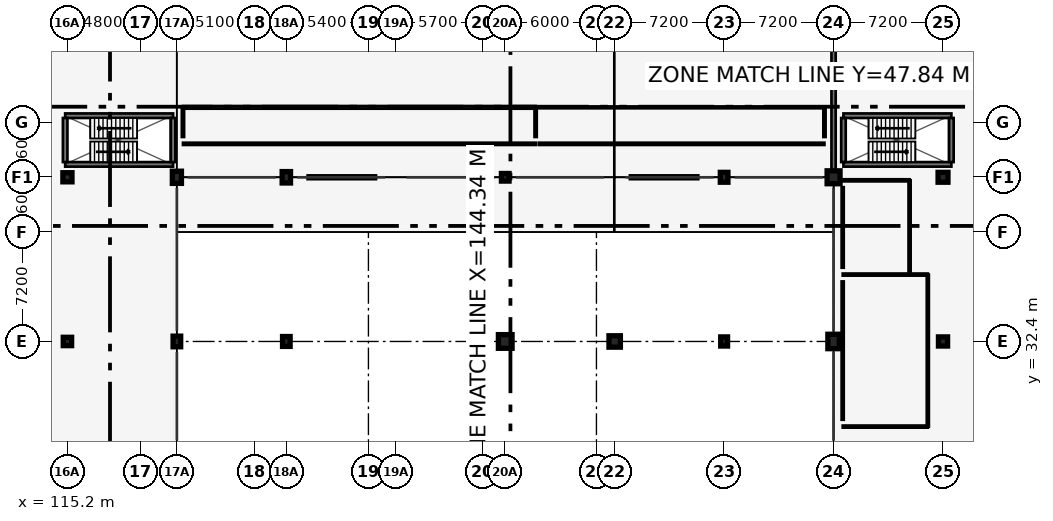
"""IFC4 building model, lengths in metres.
Left out: names, types, materials, properties, quantities, classifications, styles, units other than length and angle.
Written with IfcOpenShell. Run it as: python <this file> out.ifc"""

import sys

from ifc_helpers import new_model, si_unit, direction, frame, frame_2d, origin, origin_2d, place, context, subcontext, project, spatial, rectangle, circle, extrude, element, fill, save


model = new_model("IFC4")
c1 = context("Model", 3, precision=1e-05, world=origin(), true_north=direction((0.0, 1.0)))
c2 = subcontext(c1, "Body", "Model", "MODEL_VIEW")
j1 = project(units=[si_unit("LENGTHUNIT", "METRE"), si_unit("PLANEANGLEUNIT", "RADIAN")], contexts=[c1])
p1 = place(None, origin())
s1 = spatial("IfcSite", under=j1, at=p1, CompositionType="ELEMENT")
p2 = place(p1, origin())
s2 = spatial("IfcBuilding", under=s1, at=p2, CompositionType="ELEMENT")
p3 = place(p2, frame((0.0, 0.0, 4.8)))
s3 = spatial("IfcBuildingStorey", under=s2, at=p3, CompositionType="ELEMENT", Elevation=4.8)
p4 = place(p3, frame((115.2, 32.4, 0.0), z_axis=(0.0, 0.0, 1.0), x_axis=(1.0, 0.0, 0.0)))
e1 = element("IfcColumn", 1, at=p4, inside=s3, PredefinedType="COLUMN", context=c2, shape_type="SweptSolid", body=[
    extrude(rectangle(XDim=0.55, YDim=0.55, at=origin_2d()), origin(), (0.0, 0.0, 1.0), 4.2),
])
p5 = place(p3, frame((115.2, 43.2, 0.0), z_axis=(0.0, 0.0, 1.0), x_axis=(1.0, 0.0, 0.0)))
e2 = element("IfcColumn", 2, at=p5, inside=s3, PredefinedType="COLUMN", context=c2, shape_type="SweptSolid", body=[
    extrude(rectangle(XDim=0.6, YDim=0.6, at=origin_2d()), origin(), (0.0, 0.0, 1.0), 4.2),
])
p6 = place(p3, frame((122.4, 32.4, 0.0), z_axis=(0.0, 0.0, 1.0), x_axis=(1.0, 0.0, 0.0)))
e3 = element("IfcColumn", 3, at=p6, inside=s3, PredefinedType="COLUMN", context=c2, shape_type="SweptSolid", body=[
    extrude(rectangle(XDim=0.5, YDim=0.7, at=origin_2d()), origin(), (0.0, 0.0, 1.0), 4.2),
])
p7 = place(p3, frame((122.4, 43.2, 0.0), z_axis=(0.0, 0.0, 1.0), x_axis=(1.0, 0.0, 0.0)))
e4 = element("IfcColumn", 4, at=p7, inside=s3, PredefinedType="COLUMN", context=c2, shape_type="SweptSolid", body=[
    extrude(rectangle(XDim=0.6, YDim=0.8, at=origin_2d()), origin(), (0.0, 0.0, 1.0), 4.2),
])
p8 = place(p3, frame((129.6, 32.4, 0.0), z_axis=(0.0, 0.0, 1.0), x_axis=(1.0, 0.0, 0.0)))
e5 = element("IfcColumn", 5, at=p8, inside=s3, PredefinedType="COLUMN", context=c2, shape_type="SweptSolid", body=[
    extrude(rectangle(XDim=0.5, YDim=0.65, at=origin_2d()), origin(), (0.0, 0.0, 1.0), 4.2),
])
p9 = place(p3, frame((129.6, 43.2, 0.0), z_axis=(0.0, 0.0, 1.0), x_axis=(1.0, 0.0, 0.0)))
e6 = element("IfcColumn", 6, at=p9, inside=s3, PredefinedType="COLUMN", context=c2, shape_type="SweptSolid", body=[
    extrude(rectangle(XDim=0.55, YDim=0.75, at=origin_2d()), origin(), (0.0, 0.0, 1.0), 4.2),
])
p10 = place(p3, frame((144.0, 32.4, 0.0), z_axis=(0.0, 0.0, 1.0), x_axis=(1.0, 0.0, 0.0)))
e7 = element("IfcColumn", 7, at=p10, inside=s3, PredefinedType="COLUMN", context=c2, shape_type="SweptSolid", body=[
    extrude(circle(Radius=0.45, at=origin_2d()), origin(), (0.0, 0.0, 1.0), 4.2),
])
p11 = place(p3, frame((144.0, 43.2, 0.0), z_axis=(0.0, 0.0, 1.0), x_axis=(1.0, 0.0, 0.0)))
e8 = element("IfcColumn", 8, at=p11, inside=s3, PredefinedType="COLUMN", context=c2, shape_type="SweptSolid", body=[
    extrude(rectangle(XDim=0.5, YDim=0.5, at=origin_2d()), origin(), (0.0, 0.0, 1.0), 4.2),
])
p12 = place(p3, frame((151.2, 32.4, 0.0), z_axis=(0.0, 0.0, 1.0), x_axis=(1.0, 0.0, 0.0)))
e9 = element("IfcColumn", 9, at=p12, inside=s3, PredefinedType="COLUMN", context=c2, shape_type="SweptSolid", body=[
    extrude(rectangle(XDim=0.75, YDim=0.75, at=origin_2d()), origin(), (0.0, 0.0, 1.0), 4.2),
])
p13 = place(p3, frame((158.4, 32.4, 0.0), z_axis=(0.0, 0.0, 1.0), x_axis=(1.0, 0.0, 0.0)))
e10 = element("IfcColumn", 10, at=p13, inside=s3, PredefinedType="COLUMN", context=c2, shape_type="SweptSolid", body=[
    extrude(rectangle(XDim=0.45, YDim=0.6, at=origin_2d()), origin(), (0.0, 0.0, 1.0), 4.2),
])
p14 = place(p3, frame((158.4, 43.2, 0.0), z_axis=(0.0, 0.0, 1.0), x_axis=(1.0, 0.0, 0.0)))
e11 = element("IfcColumn", 11, at=p14, inside=s3, PredefinedType="COLUMN", context=c2, shape_type="SweptSolid", body=[
    extrude(rectangle(XDim=0.5, YDim=0.65, at=origin_2d()), origin(), (0.0, 0.0, 1.0), 4.2),
])
p15 = place(p3, frame((165.6, 32.4, 0.0), z_axis=(0.0, 0.0, 1.0), x_axis=(1.0, 0.0, 0.0)))
e12 = element("IfcColumn", 12, at=p15, inside=s3, PredefinedType="COLUMN", context=c2, shape_type="SweptSolid", body=[
    extrude(rectangle(XDim=0.75, YDim=0.95, at=origin_2d()), origin(), (0.0, 0.0, 1.0), 4.2),
])
p16 = place(p3, frame((165.6, 43.2, 0.0), z_axis=(0.0, 0.0, 1.0), x_axis=(1.0, 0.0, 0.0)))
e13 = element("IfcColumn", 13, at=p16, inside=s3, PredefinedType="COLUMN", context=c2, shape_type="SweptSolid", body=[
    extrude(rectangle(XDim=0.85, YDim=0.85, at=origin_2d()), origin(), (0.0, 0.0, 1.0), 4.2),
])
p17 = place(p3, frame((172.8, 32.4, 0.0), z_axis=(0.0, 0.0, 1.0), x_axis=(1.0, 0.0, 0.0)))
e14 = element("IfcColumn", 14, at=p17, inside=s3, PredefinedType="COLUMN", context=c2, shape_type="SweptSolid", body=[
    extrude(rectangle(XDim=0.6, YDim=0.6, at=origin_2d()), origin(), (0.0, 0.0, 1.0), 4.2),
])
p18 = place(p3, frame((172.8, 43.2, 0.0), z_axis=(0.0, 0.0, 1.0), x_axis=(1.0, 0.0, 0.0)))
e15 = element("IfcColumn", 15, at=p18, inside=s3, PredefinedType="COLUMN", context=c2, shape_type="SweptSolid", body=[
    extrude(rectangle(XDim=0.65, YDim=0.65, at=origin_2d()), origin(), (0.0, 0.0, 1.0), 4.2),
])
p19 = place(p3, frame((165.6, 86.4, 0.0), z_axis=(0.0, 0.0, 1.0), x_axis=(0.0, -1.0, 0.0)))
e16 = element("IfcWall", 16, at=p19, inside=s3, PredefinedType="SOLIDWALL", context=c2, shape_type="SweptSolid", body=[
    extrude(rectangle(XDim=43.2, YDim=0.28, at=frame_2d((21.6, 0.0))), origin(), (0.0, 0.0, 1.0), 3.5),
])
p20 = place(p19, frame((9.4, 0.0, 0.78)))
e17 = element("IfcOpeningElement", 17, at=p20, cuts=e16, PredefinedType="OPENING", context=c2, shape_type="SweptSolid", body=[
    extrude(rectangle(XDim=1.25, YDim=1.7, at=frame_2d((0.625, 0.85))), frame((0.0, 0.15, 0.0), z_axis=(0.0, -1.0, 0.0), x_axis=(1.0, 0.0, 0.0)), (0.0, 0.0, 1.0), 0.3),
])
p21 = place(p19, frame((16.6, 0.0, 0.78)))
e18 = element("IfcOpeningElement", 18, at=p21, cuts=e16, PredefinedType="OPENING", context=c2, shape_type="SweptSolid", body=[
    extrude(rectangle(XDim=1.35, YDim=1.75, at=frame_2d((0.675, 0.875))), frame((0.0, 0.15, 0.0), z_axis=(0.0, -1.0, 0.0), x_axis=(1.0, 0.0, 0.0)), (0.0, 0.0, 1.0), 0.3),
])
p22 = place(p19, frame((23.8, 0.0, 0.78)))
e19 = element("IfcOpeningElement", 19, at=p22, cuts=e16, PredefinedType="OPENING", context=c2, shape_type="SweptSolid", body=[
    extrude(rectangle(XDim=1.5, YDim=1.75, at=frame_2d((0.75, 0.875))), frame((0.0, 0.15, 0.0), z_axis=(0.0, -1.0, 0.0), x_axis=(1.0, 0.0, 0.0)), (0.0, 0.0, 1.0), 0.3),
])
p23 = place(p3, frame((131.0, 43.2, 0.0), z_axis=(0.0, 0.0, 1.0), x_axis=(1.0, 0.0, 0.0)))
e20 = element("IfcWall", 20, at=p23, inside=s3, PredefinedType="SOLIDWALL", context=c2, shape_type="SweptSolid", body=[
    extrude(rectangle(XDim=4.5, YDim=0.25, at=frame_2d((2.25, 0.0))), origin(), (0.0, 0.0, 1.0), 3.5),
])
p24 = place(p23, frame((1.35, 0.0, 0.0)))
e21 = element("IfcOpeningElement", 21, at=p24, cuts=e20, PredefinedType="OPENING", context=c2, shape_type="SweptSolid", body=[
    extrude(rectangle(XDim=1.8, YDim=2.2, at=frame_2d((0.9, 1.1))), frame((0.0, 0.135, 0.0), z_axis=(0.0, -1.0, 0.0), x_axis=(1.0, 0.0, 0.0)), (0.0, 0.0, 1.0), 0.27),
])
p25 = place(p3, frame((152.2, 43.2, 0.0), z_axis=(0.0, 0.0, 1.0), x_axis=(1.0, 0.0, 0.0)))
e22 = element("IfcWall", 22, at=p25, inside=s3, PredefinedType="SOLIDWALL", context=c2, shape_type="SweptSolid", body=[
    extrude(rectangle(XDim=4.5, YDim=0.25, at=frame_2d((2.25, 0.0))), origin(), (0.0, 0.0, 1.0), 3.5),
])
p26 = place(p25, frame((1.35, 0.0, 0.0)))
e23 = element("IfcOpeningElement", 23, at=p26, cuts=e22, PredefinedType="OPENING", context=c2, shape_type="SweptSolid", body=[
    extrude(rectangle(XDim=1.8, YDim=2.2, at=frame_2d((0.9, 1.1))), frame((0.0, 0.135, 0.0), z_axis=(0.0, -1.0, 0.0), x_axis=(1.0, 0.0, 0.0)), (0.0, 0.0, 1.0), 0.27),
])
for number, where, z_axis, x_axis in (
    (24, (166.25, 44.05, 0.0), (0.0, 0.0, 1.0), (1.0, 0.0, 0.0)),
    (25, (173.35, 47.25, 0.0), (0.0, 0.0, 1.0), (-1.0, 0.0, 0.0)),
):
    element("IfcWall", number, at=place(p3, frame(where, z_axis=z_axis, x_axis=x_axis)), inside=s3, PredefinedType="SHEAR", context=c2, shape_type="SweptSolid", body=[
        extrude(rectangle(XDim=7.1, YDim=0.3, at=frame_2d((3.55, 0.0))), origin(), (0.0, 0.0, 1.0), 3.925),
    ])
p27 = place(p3, frame((173.35, 44.2, 0.0), z_axis=(0.0, 0.0, 1.0), x_axis=(0.0, 1.0, 0.0)))
e26 = element("IfcWall", 26, at=p27, inside=s3, PredefinedType="SHEAR", context=c2, shape_type="SweptSolid", body=[
    extrude(rectangle(XDim=2.9, YDim=0.3, at=frame_2d((1.45, 0.0))), origin(), (0.0, 0.0, 1.0), 3.925),
])
p28 = place(p3, frame((166.25, 47.1, 0.0), z_axis=(0.0, 0.0, 1.0), x_axis=(0.0, -1.0, 0.0)))
e27 = element("IfcWall", 27, at=p28, inside=s3, PredefinedType="SHEAR", context=c2, shape_type="SweptSolid", body=[
    extrude(rectangle(XDim=2.9, YDim=0.3, at=frame_2d((1.45, 0.0))), origin(), (0.0, 0.0, 1.0), 3.925),
])
p29 = place(p28, frame((0.75, 0.0, 0.0)))
e28 = element("IfcOpeningElement", 28, at=p29, cuts=e27, PredefinedType="OPENING", context=c2, shape_type="SweptSolid", body=[
    extrude(rectangle(XDim=1.07, YDim=2.15, at=frame_2d((0.535, 1.075))), frame((0.0, 0.16, 0.0), z_axis=(0.0, -1.0, 0.0), x_axis=(1.0, 0.0, 0.0)), (0.0, 0.0, 1.0), 0.32),
])
for number, where, z_axis, x_axis in (
    (29, (115.05, 44.05, 0.0), (0.0, 0.0, 1.0), (1.0, 0.0, 0.0)),
    (30, (122.15, 47.25, 0.0), (0.0, 0.0, 1.0), (-1.0, 0.0, 0.0)),
):
    element("IfcWall", number, at=place(p3, frame(where, z_axis=z_axis, x_axis=x_axis)), inside=s3, PredefinedType="SHEAR", context=c2, shape_type="SweptSolid", body=[
        extrude(rectangle(XDim=7.1, YDim=0.3, at=frame_2d((3.55, 0.0))), origin(), (0.0, 0.0, 1.0), 3.925),
    ])
p30 = place(p3, frame((122.15, 44.2, 0.0), z_axis=(0.0, 0.0, 1.0), x_axis=(0.0, 1.0, 0.0)))
e31 = element("IfcWall", 31, at=p30, inside=s3, PredefinedType="SHEAR", context=c2, shape_type="SweptSolid", body=[
    extrude(rectangle(XDim=2.9, YDim=0.3, at=frame_2d((1.45, 0.0))), origin(), (0.0, 0.0, 1.0), 3.925),
])
p31 = place(p3, frame((115.05, 47.1, 0.0), z_axis=(0.0, 0.0, 1.0), x_axis=(0.0, -1.0, 0.0)))
e32 = element("IfcWall", 32, at=p31, inside=s3, PredefinedType="SHEAR", context=c2, shape_type="SweptSolid", body=[
    extrude(rectangle(XDim=2.9, YDim=0.3, at=frame_2d((1.45, 0.0))), origin(), (0.0, 0.0, 1.0), 3.925),
])
p32 = place(p31, frame((0.75, 0.0, 0.0)))
e33 = element("IfcOpeningElement", 33, at=p32, cuts=e32, PredefinedType="OPENING", context=c2, shape_type="SweptSolid", body=[
    extrude(rectangle(XDim=1.07, YDim=2.15, at=frame_2d((0.535, 1.075))), frame((0.0, 0.16, 0.0), z_axis=(0.0, -1.0, 0.0), x_axis=(1.0, 0.0, 0.0)), (0.0, 0.0, 1.0), 0.32),
])
p33 = place(p3, frame((146.0, 45.4, 0.0), z_axis=(0.0, 0.0, 1.0), x_axis=(-1.0, 0.0, 0.0)))
e34 = element("IfcWall", 34, at=p33, inside=s3, PredefinedType="PARTITIONING", context=c2, shape_type="SweptSolid", body=[
    extrude(rectangle(XDim=23.2, YDim=0.15, at=frame_2d((11.6, 0.0))), origin(), (0.0, 0.0, 1.0), 3.174),
])
for number, where, z_axis, x_axis in (
    (35, (146.0, 45.85, 0.0), (0.0, 0.0, 1.0), (0.0, 1.0, 0.0)),
    (36, (122.8, 47.8, 0.0), (0.0, 0.0, 1.0), (0.0, -1.0, 0.0)),
):
    element("IfcWall", number, at=place(p3, frame(where, z_axis=z_axis, x_axis=x_axis)), inside=s3, PredefinedType="PARTITIONING", context=c2, shape_type="SweptSolid", body=[
        extrude(rectangle(XDim=1.95, YDim=0.15, at=frame_2d((0.975, 0.0))), origin(), (0.0, 0.0, 1.0), 3.6),
    ])
p34 = place(p3, frame((122.8, 47.8, 0.0), z_axis=(0.0, 0.0, 1.0), x_axis=(1.0, 0.0, 0.0)))
e37 = element("IfcWall", 37, at=p34, inside=s3, PredefinedType="SOLIDWALL", context=c2, shape_type="SweptSolid", body=[
    extrude(rectangle(XDim=23.2, YDim=0.18, at=frame_2d((11.6, 0.0))), origin(), (0.0, 0.0, 1.0), 3.174),
])
p35 = place(p34, frame((11.09, 0.0, 0.0)))
e38 = element("IfcOpeningElement", 38, at=p35, cuts=e37, PredefinedType="OPENING", context=c2, shape_type="SweptSolid", body=[
    extrude(rectangle(XDim=1.02, YDim=2.15, at=frame_2d((0.51, 1.075))), frame((0.0, 0.1, 0.0), z_axis=(0.0, -1.0, 0.0), x_axis=(1.0, 0.0, 0.0)), (0.0, 0.0, 1.0), 0.2),
])
p36 = place(p3, frame((165.0, 45.4, 0.0), z_axis=(0.0, 0.0, 1.0), x_axis=(-1.0, 0.0, 0.0)))
e39 = element("IfcWall", 39, at=p36, inside=s3, PredefinedType="PARTITIONING", context=c2, shape_type="SweptSolid", body=[
    extrude(rectangle(XDim=18.8, YDim=0.15, at=frame_2d((9.4, 0.0))), origin(), (0.0, 0.0, 1.0), 3.479),
])
p37 = place(p3, frame((165.0, 45.85, 0.0), z_axis=(0.0, 0.0, 1.0), x_axis=(0.0, 1.0, 0.0)))
e40 = element("IfcWall", 40, at=p37, inside=s3, PredefinedType="PARTITIONING", context=c2, shape_type="SweptSolid", body=[
    extrude(rectangle(XDim=1.95, YDim=0.15, at=frame_2d((0.975, 0.0))), origin(), (0.0, 0.0, 1.0), 3.6),
])
p38 = place(p3, frame((146.2, 47.8, 0.0), z_axis=(0.0, 0.0, 1.0), x_axis=(1.0, 0.0, 0.0)))
e41 = element("IfcWall", 41, at=p38, inside=s3, PredefinedType="PARTITIONING", context=c2, shape_type="SweptSolid", body=[
    extrude(rectangle(XDim=18.8, YDim=0.125, at=frame_2d((9.4, 0.0))), origin(), (0.0, 0.0, 1.0), 3.479),
])
p39 = place(p38, frame((8.92, 0.0, 0.0)))
e42 = element("IfcOpeningElement", 42, at=p39, cuts=e41, PredefinedType="OPENING", context=c2, shape_type="SweptSolid", body=[
    extrude(rectangle(XDim=0.96, YDim=2.15, at=frame_2d((0.48, 1.075))), frame((0.0, 0.073, 0.0), z_axis=(0.0, -1.0, 0.0), x_axis=(1.0, 0.0, 0.0)), (0.0, 0.0, 1.0), 0.145),
])
for number, where, z_axis, x_axis in (
    (43, (166.2, 36.8, 0.0), (0.0, 0.0, 1.0), (1.0, 0.0, 0.0)),
    (44, (171.8, 26.8, 0.0), (0.0, 0.0, 1.0), (-1.0, 0.0, 0.0)),
):
    element("IfcWall", number, at=place(p3, frame(where, z_axis=z_axis, x_axis=x_axis)), inside=s3, PredefinedType="PARTITIONING", context=c2, shape_type="SweptSolid", body=[
        extrude(rectangle(XDim=5.6, YDim=0.14, at=frame_2d((2.8, 0.0))), origin(), (0.0, 0.0, 1.0), 3.5),
    ])
p40 = place(p3, frame((166.2, 36.35, 0.0), z_axis=(0.0, 0.0, 1.0), x_axis=(0.0, -1.0, 0.0)))
e45 = element("IfcWall", 45, at=p40, inside=s3, PredefinedType="PARTITIONING", context=c2, shape_type="SweptSolid", body=[
    extrude(rectangle(XDim=9.1, YDim=0.14, at=frame_2d((4.55, 0.0))), origin(), (0.0, 0.0, 1.0), 3.5),
])
p41 = place(p3, frame((171.8, 26.8, 0.0), z_axis=(0.0, 0.0, 1.0), x_axis=(0.0, 1.0, 0.0)))
e46 = element("IfcWall", 46, at=p41, inside=s3, PredefinedType="PARTITIONING", context=c2, shape_type="SweptSolid", body=[
    extrude(rectangle(XDim=10.0, YDim=0.14, at=frame_2d((5.0, 0.0))), origin(), (0.0, 0.0, 1.0), 3.5),
])
p42 = place(p41, frame((2.703, 0.0, 0.0)))
e47 = element("IfcOpeningElement", 47, at=p42, cuts=e46, PredefinedType="OPENING", context=c2, shape_type="SweptSolid", body=[
    extrude(rectangle(XDim=0.99, YDim=2.15, at=frame_2d((0.495, 1.075))), frame((0.0, 0.08, 0.0), z_axis=(0.0, -1.0, 0.0), x_axis=(1.0, 0.0, 0.0)), (0.0, 0.0, 1.0), 0.16),
])
p43 = place(p3, frame((166.2, 43.0, 0.0), z_axis=(0.0, 0.0, 1.0), x_axis=(1.0, 0.0, 0.0)))
e48 = element("IfcWall", 48, at=p43, inside=s3, PredefinedType="PARTITIONING", context=c2, shape_type="SweptSolid", body=[
    extrude(rectangle(XDim=4.4, YDim=0.14, at=frame_2d((2.2, 0.0))), origin(), (0.0, 0.0, 1.0), 3.107),
])
p44 = place(p3, frame((166.2, 42.55, 0.0), z_axis=(0.0, 0.0, 1.0), x_axis=(0.0, -1.0, 0.0)))
e49 = element("IfcWall", 49, at=p44, inside=s3, PredefinedType="PARTITIONING", context=c2, shape_type="SweptSolid", body=[
    extrude(rectangle(XDim=5.3, YDim=0.14, at=frame_2d((2.65, 0.0))), origin(), (0.0, 0.0, 1.0), 3.5),
])
p45 = place(p3, frame((170.6, 37.0, 0.0), z_axis=(0.0, 0.0, 1.0), x_axis=(0.0, 1.0, 0.0)))
e50 = element("IfcWall", 50, at=p45, inside=s3, PredefinedType="PARTITIONING", context=c2, shape_type="SweptSolid", body=[
    extrude(rectangle(XDim=6.0, YDim=0.14, at=frame_2d((3.0, 0.0))), origin(), (0.0, 0.0, 1.0), 3.107),
])
p46 = place(p45, frame((2.51, 0.0, 0.0)))
e51 = element("IfcOpeningElement", 51, at=p46, cuts=e50, PredefinedType="OPENING", context=c2, shape_type="SweptSolid", body=[
    extrude(rectangle(XDim=0.98, YDim=2.15, at=frame_2d((0.49, 1.075))), frame((0.0, 0.08, 0.0), z_axis=(0.0, -1.0, 0.0), x_axis=(1.0, 0.0, 0.0)), (0.0, 0.0, 1.0), 0.16),
])
p47 = place(p24, origin())
e52 = element("IfcDoor", 52, at=p47, inside=s3, OperationType="DOUBLE_SWING_RIGHT", PredefinedType="DOOR", context=c2, shape_type="SweptSolid", body=[
    extrude(rectangle(XDim=1.8, YDim=2.2, at=frame_2d((0.9, 1.1))), frame((0.0, 0.025, 0.0), z_axis=(0.0, -1.0, 0.0), x_axis=(1.0, 0.0, 0.0)), (0.0, 0.0, 1.0), 0.05),
])
fill(e21, e52)
p48 = place(p26, origin())
e53 = element("IfcDoor", 53, at=p48, inside=s3, OperationType="DOUBLE_SWING_RIGHT", PredefinedType="DOOR", context=c2, shape_type="SweptSolid", body=[
    extrude(rectangle(XDim=1.8, YDim=2.2, at=frame_2d((0.9, 1.1))), frame((0.0, 0.025, 0.0), z_axis=(0.0, -1.0, 0.0), x_axis=(1.0, 0.0, 0.0)), (0.0, 0.0, 1.0), 0.05),
])
fill(e23, e53)
p49 = place(p29, origin())
e54 = element("IfcDoor", 54, at=p49, inside=s3, OperationType="SINGLE_SWING_RIGHT", PredefinedType="DOOR", context=c2, shape_type="SweptSolid", body=[
    extrude(rectangle(XDim=1.07, YDim=2.15, at=frame_2d((0.535, 1.075))), frame((0.0, 0.025, 0.0), z_axis=(0.0, -1.0, 0.0), x_axis=(1.0, 0.0, 0.0)), (0.0, 0.0, 1.0), 0.05),
])
fill(e28, e54)
p50 = place(p32, origin())
e55 = element("IfcDoor", 55, at=p50, inside=s3, OperationType="SINGLE_SWING_RIGHT", PredefinedType="DOOR", context=c2, shape_type="SweptSolid", body=[
    extrude(rectangle(XDim=1.07, YDim=2.15, at=frame_2d((0.535, 1.075))), frame((0.0, 0.025, 0.0), z_axis=(0.0, -1.0, 0.0), x_axis=(1.0, 0.0, 0.0)), (0.0, 0.0, 1.0), 0.05),
])
fill(e33, e55)
p51 = place(p35, origin())
e56 = element("IfcDoor", 56, at=p51, inside=s3, OperationType="SINGLE_SWING_RIGHT", PredefinedType="DOOR", context=c2, shape_type="SweptSolid", body=[
    extrude(rectangle(XDim=1.02, YDim=2.15, at=frame_2d((0.51, 1.075))), frame((0.0, 0.025, 0.0), z_axis=(0.0, -1.0, 0.0), x_axis=(1.0, 0.0, 0.0)), (0.0, 0.0, 1.0), 0.05),
])
fill(e38, e56)
p52 = place(p39, origin())
e57 = element("IfcDoor", 57, at=p52, inside=s3, OperationType="SINGLE_SWING_LEFT", PredefinedType="DOOR", context=c2, shape_type="SweptSolid", body=[
    extrude(rectangle(XDim=0.96, YDim=2.15, at=frame_2d((0.48, 1.075))), frame((0.0, 0.025, 0.0), z_axis=(0.0, -1.0, 0.0), x_axis=(1.0, 0.0, 0.0)), (0.0, 0.0, 1.0), 0.05),
])
fill(e42, e57)
p53 = place(p42, origin())
e58 = element("IfcDoor", 58, at=p53, inside=s3, OperationType="SINGLE_SWING_RIGHT", PredefinedType="DOOR", context=c2, shape_type="SweptSolid", body=[
    extrude(rectangle(XDim=0.99, YDim=2.15, at=frame_2d((0.495, 1.075))), frame((0.0, 0.025, 0.0), z_axis=(0.0, -1.0, 0.0), x_axis=(1.0, 0.0, 0.0)), (0.0, 0.0, 1.0), 0.05),
])
fill(e47, e58)
p54 = place(p46, origin())
e59 = element("IfcDoor", 59, at=p54, inside=s3, OperationType="SINGLE_SWING_LEFT", PredefinedType="DOOR", context=c2, shape_type="SweptSolid", body=[
    extrude(rectangle(XDim=0.98, YDim=2.15, at=frame_2d((0.49, 1.075))), frame((0.0, 0.025, 0.0), z_axis=(0.0, -1.0, 0.0), x_axis=(1.0, 0.0, 0.0)), (0.0, 0.0, 1.0), 0.05),
])
fill(e51, e59)
save(model, sys.argv[1])
